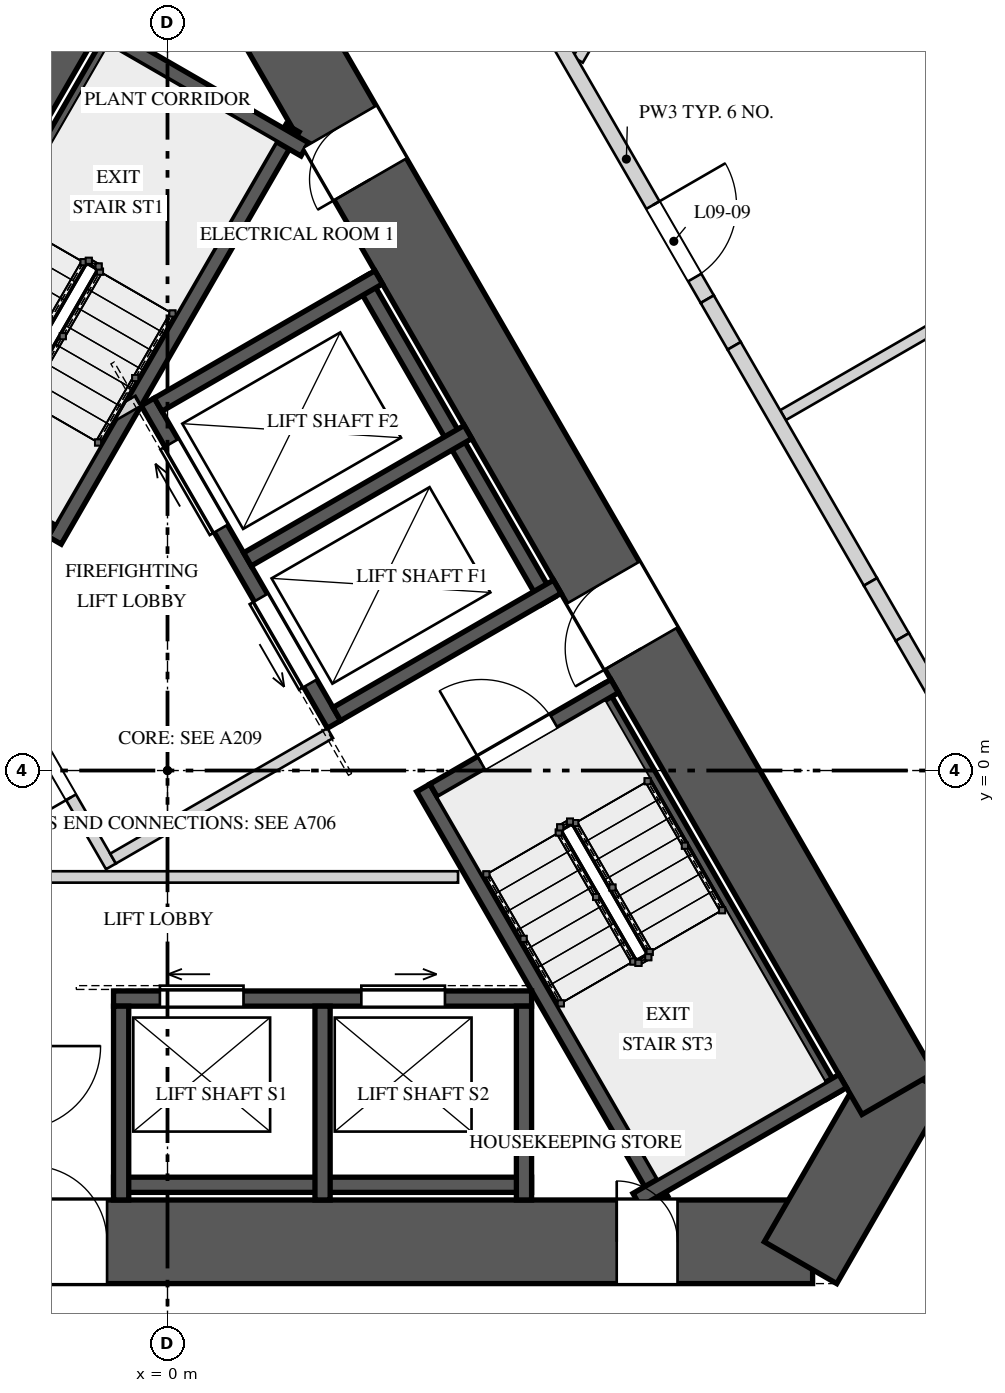
"""IFC4 building model, lengths in metres.
Left out: names, types, materials, properties, quantities, classifications, styles, units other than length and angle.
Written with IfcOpenShell. Run it as: python <this file> out.ifc"""

import sys

from ifc_helpers import new_model, si_unit, direction, frame, frame_2d, origin, place, context, subcontext, project, spatial, rectangle, extrude, element, fill, save


model = new_model("IFC4")
c1 = context("Model", 3, precision=1e-05, world=origin(), true_north=direction((0.0, 1.0)))
c2 = subcontext(c1, "Body", "Model", "MODEL_VIEW")
j1 = project(units=[si_unit("LENGTHUNIT", "METRE"), si_unit("PLANEANGLEUNIT", "RADIAN")], contexts=[c1])
p1 = place(None, origin())
s1 = spatial("IfcSite", under=j1, at=p1, CompositionType="ELEMENT")
p2 = place(p1, origin())
s2 = spatial("IfcBuilding", under=s1, at=p2, CompositionType="ELEMENT")
p3 = place(p2, frame((0.0, 0.0, 46.0)))
s3 = spatial("IfcBuildingStorey", under=s2, at=p3, CompositionType="ELEMENT", Elevation=46.0)
p4 = place(p3, frame((-1.126, 10.45, 0.0), z_axis=(0.0, 0.0, 1.0), x_axis=(-0.500001757713, -0.866024388966, 0.0)))
e1 = element("IfcWall", 1, at=p4, inside=s3, PredefinedType="SHEAR", context=c2, shape_type="SweptSolid", body=[
    extrude(rectangle(XDim=16.974, YDim=1.1, at=frame_2d((8.487, 0.0))), origin(), (0.0, 0.0, 1.0), 5.2),
])
p5 = place(p4, frame((6.692, 0.0, 0.0)))
e2 = element("IfcOpeningElement", 2, at=p5, cuts=e1, PredefinedType="OPENING", context=c2, shape_type="SweptSolid", body=[
    extrude(rectangle(XDim=1.0, YDim=2.4, at=frame_2d((0.5, 1.2))), frame((0.0, 0.56, 0.0), z_axis=(0.0, -1.0, 0.0), x_axis=(1.0, 0.0, 0.0)), (0.0, 0.0, 1.0), 1.12),
])
p6 = place(p3, frame((-8.487, -6.2, 0.0), z_axis=(0.0, 0.0, 1.0), x_axis=(1.0, 0.0, 0.0)))
e3 = element("IfcWall", 3, at=p6, inside=s3, PredefinedType="SHEAR", context=c2, shape_type="SweptSolid", body=[
    extrude(rectangle(XDim=16.974, YDim=1.1, at=frame_2d((8.487, 0.0))), origin(), (0.0, 0.0, 1.0), 5.2),
])
p7 = place(p6, frame((6.692, 0.0, 0.0)))
e4 = element("IfcOpeningElement", 4, at=p7, cuts=e3, PredefinedType="OPENING", context=c2, shape_type="SweptSolid", body=[
    extrude(rectangle(XDim=1.0, YDim=2.4, at=frame_2d((0.5, 1.2))), frame((0.0, 0.56, 0.0), z_axis=(0.0, -1.0, 0.0), x_axis=(1.0, 0.0, 0.0)), (0.0, 0.0, 1.0), 1.12),
])
p8 = place(p6, frame((14.397, 0.0, 0.0)))
e5 = element("IfcOpeningElement", 5, at=p8, cuts=e3, PredefinedType="OPENING", context=c2, shape_type="SweptSolid", body=[
    extrude(rectangle(XDim=0.8, YDim=2.1, at=frame_2d((0.4, 1.05))), frame((0.0, 0.56, 0.0), z_axis=(0.0, -1.0, 0.0), x_axis=(1.0, 0.0, 0.0)), (0.0, 0.0, 1.0), 1.12),
])
p9 = place(p3, frame((8.328, -6.475, 0.0), z_axis=(0.0, 0.0, 1.0), x_axis=(0.499995765644, 0.866027848477, 0.0)))
e6 = element("IfcWall", 6, at=p9, inside=s3, PredefinedType="SHEAR", context=c2, shape_type="SweptSolid", body=[
    extrude(rectangle(XDim=2.887, YDim=1.1, at=frame_2d((1.443, 0.0))), origin(), (0.0, 0.0, 1.0), 5.2),
])
p10 = place(p3, frame((9.613, -4.25, 0.0), z_axis=(0.0, 0.0, 1.0), x_axis=(-0.500001757713, 0.866024388966, 0.0)))
e7 = element("IfcWall", 7, at=p10, inside=s3, PredefinedType="SHEAR", context=c2, shape_type="SweptSolid", body=[
    extrude(rectangle(XDim=16.974, YDim=1.1, at=frame_2d((8.487, 0.0))), origin(), (0.0, 0.0, 1.0), 5.2),
])
p11 = place(p10, frame((6.762, 0.0, 0.0)))
e8 = element("IfcOpeningElement", 8, at=p11, cuts=e7, PredefinedType="OPENING", context=c2, shape_type="SweptSolid", body=[
    extrude(rectangle(XDim=1.0, YDim=2.4, at=frame_2d((0.5, 1.2))), frame((0.0, 0.56, 0.0), z_axis=(0.0, -1.0, 0.0), x_axis=(1.0, 0.0, 0.0)), (0.0, 0.0, 1.0), 1.12),
])
p12 = place(p10, frame((13.889, 0.0, 0.0)))
e9 = element("IfcOpeningElement", 9, at=p12, cuts=e7, PredefinedType="OPENING", context=c2, shape_type="SweptSolid", body=[
    extrude(rectangle(XDim=0.8, YDim=2.1, at=frame_2d((0.4, 1.05))), frame((0.0, 0.56, 0.0), z_axis=(0.0, -1.0, 0.0), x_axis=(1.0, 0.0, 0.0)), (0.0, 0.0, 1.0), 1.12),
])
p13 = place(p3, frame((-0.68, 9.722, 0.0), z_axis=(0.0, 0.0, 1.0), x_axis=(-0.49998037582, -0.866036733513, 0.0)))
e10 = element("IfcWall", 10, at=p13, inside=s3, PredefinedType="SOLIDWALL", context=c2, shape_type="SweptSolid", body=[
    extrude(rectangle(XDim=6.2, YDim=0.2, at=frame_2d((3.1, 0.0))), origin(), (0.0, 0.0, 1.0), 4.85),
])
p14 = place(p3, frame((1.646, 8.45, 0.0), z_axis=(0.0, 0.0, 1.0), x_axis=(-0.500006002103, -0.866021938441, 0.0)))
e11 = element("IfcWall", 11, at=p14, inside=s3, PredefinedType="SOLIDWALL", context=c2, shape_type="SweptSolid", body=[
    extrude(rectangle(XDim=6.261, YDim=0.2, at=frame_2d((3.13, 0.0))), origin(), (0.0, 0.0, 1.0), 4.85),
])
p15 = place(p3, frame((1.806, 8.172, 0.0), z_axis=(0.0, 0.0, 1.0), x_axis=(-0.866054327916, 0.499949898588, 0.0)))
e12 = element("IfcWall", 12, at=p15, inside=s3, PredefinedType="SOLIDWALL", context=c2, shape_type="SweptSolid", body=[
    extrude(rectangle(XDim=3.128, YDim=0.2, at=frame_2d((1.564, 0.0))), origin(), (0.0, 0.0, 1.0), 4.85),
])
p16 = place(p3, frame((-1.521, 3.165, 0.0), z_axis=(0.0, 0.0, 1.0), x_axis=(-0.866027397988, 0.499996545922, 0.0)))
e13 = element("IfcWall", 13, at=p16, inside=s3, PredefinedType="SOLIDWALL", context=c2, shape_type="SweptSolid", body=[
    extrude(rectangle(XDim=2.75, YDim=0.2, at=frame_2d((1.375, 0.0))), origin(), (0.0, 0.0, 1.0), 4.85),
])
p17 = place(p16, frame((0.725, 0.0, 0.0)))
e14 = element("IfcOpeningElement", 14, at=p17, cuts=e13, PredefinedType="OPENING", context=c2, shape_type="SweptSolid", body=[
    extrude(rectangle(XDim=1.1, YDim=2.4, at=frame_2d((0.55, 1.2))), frame((0.0, 0.11, 0.0), z_axis=(0.0, -1.0, 0.0), x_axis=(1.0, 0.0, 0.0)), (0.0, 0.0, 1.0), 0.22),
])
p18 = place(p3, frame((8.76, -4.272, 0.0), z_axis=(0.0, 0.0, 1.0), x_axis=(-0.49998037582, 0.866036733513, 0.0)))
e15 = element("IfcWall", 15, at=p18, inside=s3, PredefinedType="SOLIDWALL", context=c2, shape_type="SweptSolid", body=[
    extrude(rectangle(XDim=6.2, YDim=0.2, at=frame_2d((3.1, 0.0))), origin(), (0.0, 0.0, 1.0), 4.85),
])
p19 = place(p3, frame((6.495, -5.65, 0.0), z_axis=(0.0, 0.0, 1.0), x_axis=(-0.499976754523, 0.866038824151, 0.0)))
e16 = element("IfcWall", 16, at=p19, inside=s3, PredefinedType="SOLIDWALL", context=c2, shape_type="SweptSolid", body=[
    extrude(rectangle(XDim=6.26, YDim=0.2, at=frame_2d((3.13, 0.0))), origin(), (0.0, 0.0, 1.0), 4.85),
])
p20 = place(p3, frame((6.174, -5.65, 0.0), z_axis=(0.0, 0.0, 1.0), x_axis=(0.866054327916, 0.499949898588, 0.0)))
e17 = element("IfcWall", 17, at=p20, inside=s3, PredefinedType="SOLIDWALL", context=c2, shape_type="SweptSolid", body=[
    extrude(rectangle(XDim=3.128, YDim=0.2, at=frame_2d((1.564, 0.0))), origin(), (0.0, 0.0, 1.0), 4.85),
])
p21 = place(p3, frame((3.501, -0.265, 0.0), z_axis=(0.0, 0.0, 1.0), x_axis=(0.866027397988, 0.499996545922, 0.0)))
e18 = element("IfcWall", 18, at=p21, inside=s3, PredefinedType="SOLIDWALL", context=c2, shape_type="SweptSolid", body=[
    extrude(rectangle(XDim=2.75, YDim=0.2, at=frame_2d((1.375, 0.0))), origin(), (0.0, 0.0, 1.0), 4.85),
])
p22 = place(p21, frame((0.725, 0.0, 0.0)))
e19 = element("IfcOpeningElement", 19, at=p22, cuts=e18, PredefinedType="OPENING", context=c2, shape_type="SweptSolid", body=[
    extrude(rectangle(XDim=1.1, YDim=2.4, at=frame_2d((0.55, 1.2))), frame((0.0, 0.11, 0.0), z_axis=(0.0, -1.0, 0.0), x_axis=(1.0, 0.0, 0.0)), (0.0, 0.0, 1.0), 0.22),
])
p23 = place(p3, frame((-0.71, -3.0, 0.0), z_axis=(0.0, 0.0, 1.0), x_axis=(1.0, 0.0, 0.0)))
e20 = element("IfcWall", 20, at=p23, inside=s3, PredefinedType="SOLIDWALL", context=c2, shape_type="SweptSolid", body=[
    extrude(rectangle(XDim=5.5, YDim=0.2, at=frame_2d((2.75, 0.0))), origin(), (0.0, 0.0, 1.0), 4.85),
])
p24 = place(p23, frame((0.61, 0.0, 0.0)))
e21 = element("IfcOpeningElement", 21, at=p24, cuts=e20, PredefinedType="OPENING", context=c2, shape_type="SweptSolid", body=[
    extrude(rectangle(XDim=1.1, YDim=2.1, at=frame_2d((0.55, 1.05))), frame((0.0, 0.11, 0.0), z_axis=(0.0, -1.0, 0.0), x_axis=(1.0, 0.0, 0.0)), (0.0, 0.0, 1.0), 0.22),
])
p25 = place(p23, frame((3.26, 0.0, 0.0)))
e22 = element("IfcOpeningElement", 22, at=p25, cuts=e20, PredefinedType="OPENING", context=c2, shape_type="SweptSolid", body=[
    extrude(rectangle(XDim=1.1, YDim=2.1, at=frame_2d((0.55, 1.05))), frame((0.0, 0.11, 0.0), z_axis=(0.0, -1.0, 0.0), x_axis=(1.0, 0.0, 0.0)), (0.0, 0.0, 1.0), 0.22),
])
p26 = place(p3, frame((-0.71, -5.45, 0.0), z_axis=(0.0, 0.0, 1.0), x_axis=(1.0, 0.0, 0.0)))
e23 = element("IfcWall", 23, at=p26, inside=s3, PredefinedType="SOLIDWALL", context=c2, shape_type="SweptSolid", body=[
    extrude(rectangle(XDim=5.5, YDim=0.2, at=frame_2d((2.75, 0.0))), origin(), (0.0, 0.0, 1.0), 4.85),
])
for number, where, z_axis, x_axis in (
    (24, (-0.61, -3.1, 0.0), (0.0, 0.0, 1.0), (0.0, -1.0, 0.0)),
    (25, (2.04, -3.1, 0.0), (0.0, 0.0, 1.0), (0.0, -1.0, 0.0)),
    (26, (4.69, -3.1, 0.0), (0.0, 0.0, 1.0), (0.0, -1.0, 0.0)),
):
    element("IfcWall", number, at=place(p3, frame(where, z_axis=z_axis, x_axis=x_axis)), inside=s3, PredefinedType="SOLIDWALL", context=c2, shape_type="SweptSolid", body=[
        extrude(rectangle(XDim=2.55, YDim=0.2, at=frame_2d((1.275, 0.0))), origin(), (0.0, 0.0, 1.0), 4.85),
    ])
p27 = place(p3, frame((2.19, 0.606, 0.0), z_axis=(0.0, 0.0, 1.0), x_axis=(-0.500002801628, 0.866023786258, 0.0)))
e27 = element("IfcWall", 27, at=p27, inside=s3, PredefinedType="SOLIDWALL", context=c2, shape_type="SweptSolid", body=[
    extrude(rectangle(XDim=4.9, YDim=0.2, at=frame_2d((2.45, 0.0))), origin(), (0.0, 0.0, 1.0), 4.85),
])
p28 = place(p27, frame((0.625, 0.0, 0.0)))
e28 = element("IfcOpeningElement", 28, at=p28, cuts=e27, PredefinedType="OPENING", context=c2, shape_type="SweptSolid", body=[
    extrude(rectangle(XDim=1.3, YDim=2.1, at=frame_2d((0.65, 1.05))), frame((0.0, 0.11, 0.0), z_axis=(0.0, -1.0, 0.0), x_axis=(1.0, 0.0, 0.0)), (0.0, 0.0, 1.0), 0.22),
])
p29 = place(p27, frame((2.975, 0.0, 0.0)))
e29 = element("IfcOpeningElement", 29, at=p29, cuts=e27, PredefinedType="OPENING", context=c2, shape_type="SweptSolid", body=[
    extrude(rectangle(XDim=1.3, YDim=2.1, at=frame_2d((0.65, 1.05))), frame((0.0, 0.11, 0.0), z_axis=(0.0, -1.0, 0.0), x_axis=(1.0, 0.0, 0.0)), (0.0, 0.0, 1.0), 0.22),
])
p30 = place(p3, frame((5.005, 2.231, 0.0), z_axis=(0.0, 0.0, 1.0), x_axis=(-0.500002801628, 0.866023786258, 0.0)))
e30 = element("IfcWall", 30, at=p30, inside=s3, PredefinedType="SOLIDWALL", context=c2, shape_type="SweptSolid", body=[
    extrude(rectangle(XDim=4.9, YDim=0.2, at=frame_2d((2.45, 0.0))), origin(), (0.0, 0.0, 1.0), 4.85),
])
p31 = place(p3, frame((2.227, 0.743, 0.0), z_axis=(0.0, 0.0, 1.0), x_axis=(0.866014461049, 0.500018952895, 0.0)))
e31 = element("IfcWall", 31, at=p31, inside=s3, PredefinedType="SOLIDWALL", context=c2, shape_type="SweptSolid", body=[
    extrude(rectangle(XDim=3.35, YDim=0.2, at=frame_2d((1.675, 0.0))), origin(), (0.0, 0.0, 1.0), 4.85),
])
p32 = place(p3, frame((1.052, 2.778, 0.0), z_axis=(0.0, 0.0, 1.0), x_axis=(0.866032680314, 0.499987396469, 0.0)))
e32 = element("IfcWall", 32, at=p32, inside=s3, PredefinedType="SOLIDWALL", context=c2, shape_type="SweptSolid", body=[
    extrude(rectangle(XDim=3.35, YDim=0.2, at=frame_2d((1.675, 0.0))), origin(), (0.0, 0.0, 1.0), 4.85),
])
p33 = place(p3, frame((-0.123, 4.813, 0.0), z_axis=(0.0, 0.0, 1.0), x_axis=(0.866014461049, 0.500018952895, 0.0)))
e33 = element("IfcWall", 33, at=p33, inside=s3, PredefinedType="SOLIDWALL", context=c2, shape_type="SweptSolid", body=[
    extrude(rectangle(XDim=3.35, YDim=0.2, at=frame_2d((1.675, 0.0))), origin(), (0.0, 0.0, 1.0), 4.85),
])
p34 = place(p3, frame((-0.744, -1.261, 0.0), z_axis=(0.0, 0.0, 1.0), x_axis=(-0.500004234368, 0.866022959057, 0.0)))
e34 = element("IfcWall", 34, at=p34, inside=s3, PredefinedType="PARTITIONING", context=c2, shape_type="SweptSolid", body=[
    extrude(rectangle(XDim=3.125, YDim=0.15, at=frame_2d((1.562, 0.0))), origin(), (0.0, 0.0, 1.0), 4.85),
])
p35 = place(p34, frame((1.05, 0.0, 0.0)))
e35 = element("IfcOpeningElement", 35, at=p35, cuts=e34, PredefinedType="OPENING", context=c2, shape_type="SweptSolid", body=[
    extrude(rectangle(XDim=1.1, YDim=2.4, at=frame_2d((0.55, 1.2))), frame((0.0, 0.085, 0.0), z_axis=(0.0, -1.0, 0.0), x_axis=(1.0, 0.0, 0.0)), (0.0, 0.0, 1.0), 0.17),
])
p36 = place(p3, frame((-0.717, -1.159, 0.0), z_axis=(0.0, 0.0, 1.0), x_axis=(0.866008176907, 0.50002983664, 0.0)))
e36 = element("IfcWall", 36, at=p36, inside=s3, PredefinedType="PARTITIONING", context=c2, shape_type="SweptSolid", body=[
    extrude(rectangle(XDim=3.3, YDim=0.15, at=frame_2d((1.65, 0.0))), origin(), (0.0, 0.0, 1.0), 4.85),
])
p37 = place(p3, frame((-2.178, 1.372, 0.0), z_axis=(0.0, 0.0, 1.0), x_axis=(0.258808958833, 0.96592852884, 0.0)))
e37 = element("IfcWall", 37, at=p37, inside=s3, PredefinedType="PARTITIONING", context=c2, shape_type="SweptSolid", body=[
    extrude(rectangle(XDim=2.903, YDim=0.15, at=frame_2d((1.451, 0.0))), origin(), (0.0, 0.0, 1.0), 4.85),
])
p38 = place(p3, frame((-1.51, 4.215, 0.0), z_axis=(0.0, 0.0, 1.0), x_axis=(0.866085525409, 0.49989585183, 0.0)))
e38 = element("IfcWall", 38, at=p38, inside=s3, PredefinedType="PARTITIONING", context=c2, shape_type="SweptSolid", body=[
    extrude(rectangle(XDim=1.3, YDim=0.15, at=frame_2d((0.65, 0.0))), origin(), (0.0, 0.0, 1.0), 4.85),
])
p39 = place(p3, frame((-4.053, -1.4, 0.0), z_axis=(0.0, 0.0, 1.0), x_axis=(1.0, 0.0, 0.0)))
e39 = element("IfcWall", 39, at=p39, inside=s3, PredefinedType="PARTITIONING", context=c2, shape_type="SweptSolid", body=[
    extrude(rectangle(XDim=7.876, YDim=0.15, at=frame_2d((3.938, 0.0))), origin(), (0.0, 0.0, 1.0), 4.85),
])
p40 = place(p3, frame((8.097, 4.675, 0.0), z_axis=(0.0, 0.0, 1.0), x_axis=(0.866018381195, 0.500012163284, 0.0)))
e40 = element("IfcWall", 40, at=p40, inside=s3, PredefinedType="PARTITIONING", context=c2, shape_type="SweptSolid", body=[
    extrude(rectangle(XDim=8.0, YDim=0.15, at=frame_2d((4.0, 0.0))), origin(), (0.0, 0.0, 1.0), 4.85),
])
p41 = place(p3, frame((8.458, 14.65, 0.0), z_axis=(0.0, 0.0, 1.0), x_axis=(-0.500013695359, -0.866017496621, 0.0)))
e41 = element("IfcWall", 41, at=p41, inside=s3, PredefinedType="PARTITIONING", context=c2, shape_type="SweptSolid", body=[
    extrude(rectangle(XDim=6.119, YDim=0.15, at=frame_2d((3.06, 0.0))), origin(), (0.0, 0.0, 1.0), 4.85),
])
p42 = place(p3, frame((4.973, 9.887, 0.0), z_axis=(0.0, 0.0, 1.0), x_axis=(0.500000470374, -0.866025132214, 0.0)))
e42 = element("IfcWall", 42, at=p42, inside=s3, PredefinedType="SOLIDWALL", context=c2, shape_type="SweptSolid", body=[
    extrude(rectangle(XDim=4.257, YDim=0.2, at=frame_2d((2.128, 0.0))), origin(), (0.0, 0.0, 1.0), 4.85),
])
p43 = place(p42, frame((2.827, 0.0, 0.0)))
e43 = element("IfcOpeningElement", 43, at=p43, cuts=e42, PredefinedType="OPENING", context=c2, shape_type="SweptSolid", body=[
    extrude(rectangle(XDim=1.1, YDim=2.2, at=frame_2d((0.55, 1.1))), frame((0.0, 0.11, 0.0), z_axis=(0.0, -1.0, 0.0), x_axis=(1.0, 0.0, 0.0)), (0.0, 0.0, 1.0), 0.22),
])
p44 = place(p3, frame((7.101, 6.201, 0.0), z_axis=(0.0, 0.0, 1.0), x_axis=(0.499881507708, -0.866093804534, 0.0)))
e44 = element("IfcWall", 44, at=p44, inside=s3, PredefinedType="SOLIDWALL", context=c2, shape_type="SweptSolid", body=[
    extrude(rectangle(XDim=0.709, YDim=0.2, at=frame_2d((0.354, 0.0))), origin(), (0.0, 0.0, 1.0), 4.15),
])
p45 = place(p3, frame((7.455, 5.587, 0.0), z_axis=(0.0, 0.0, 1.0), x_axis=(0.500013241293, -0.866017758786, 0.0)))
e45 = element("IfcWall", 45, at=p45, inside=s3, PredefinedType="SOLIDWALL", context=c2, shape_type="SweptSolid", body=[
    extrude(rectangle(XDim=3.585, YDim=0.2, at=frame_2d((1.793, 0.0))), origin(), (0.0, 0.0, 1.0), 4.85),
])
p46 = place(p3, frame((9.248, 2.482, 0.0), z_axis=(0.0, 0.0, 1.0), x_axis=(0.500117447933, -0.865957584569, 0.0)))
e46 = element("IfcWall", 46, at=p46, inside=s3, PredefinedType="SOLIDWALL", context=c2, shape_type="SweptSolid", body=[
    extrude(rectangle(XDim=0.838, YDim=0.2, at=frame_2d((0.419, 0.0))), origin(), (0.0, 0.0, 1.0), 3.95),
])
p47 = place(p3, frame((9.667, 1.756, 0.0), z_axis=(0.0, 0.0, 1.0), x_axis=(0.499964529649, -0.866045881633, 0.0)))
e47 = element("IfcWall", 47, at=p47, inside=s3, PredefinedType="SOLIDWALL", context=c2, shape_type="SweptSolid", body=[
    extrude(rectangle(XDim=2.794, YDim=0.2, at=frame_2d((1.397, 0.0))), origin(), (0.0, 0.0, 1.0), 4.85),
])
p48 = place(p47, frame((1.18, 0.0, 0.0)))
e48 = element("IfcOpeningElement", 48, at=p48, cuts=e47, PredefinedType="OPENING", context=c2, shape_type="SweptSolid", body=[
    extrude(rectangle(XDim=1.1, YDim=2.2, at=frame_2d((0.55, 1.1))), frame((0.0, 0.11, 0.0), z_axis=(0.0, -1.0, 0.0), x_axis=(1.0, 0.0, 0.0)), (0.0, 0.0, 1.0), 0.22),
])
p49 = place(p22, origin())
e49 = element("IfcDoor", 49, at=p49, inside=s3, OperationType="SINGLE_SWING_RIGHT", PredefinedType="DOOR", context=c2, shape_type="SweptSolid", body=[
    extrude(rectangle(XDim=1.1, YDim=2.4, at=frame_2d((0.55, 1.2))), frame((0.0, 0.025, 0.0), z_axis=(0.0, -1.0, 0.0), x_axis=(1.0, 0.0, 0.0)), (0.0, 0.0, 1.0), 0.05),
])
fill(e19, e49)
p50 = place(p24, origin())
e50 = element("IfcDoor", 50, at=p50, inside=s3, OperationType="SLIDING_TO_LEFT", PredefinedType="DOOR", context=c2, shape_type="SweptSolid", body=[
    extrude(rectangle(XDim=1.1, YDim=2.1, at=frame_2d((0.55, 1.05))), frame((0.0, 0.025, 0.0), z_axis=(0.0, -1.0, 0.0), x_axis=(1.0, 0.0, 0.0)), (0.0, 0.0, 1.0), 0.05),
])
fill(e21, e50)
p51 = place(p25, origin())
e51 = element("IfcDoor", 51, at=p51, inside=s3, OperationType="SLIDING_TO_RIGHT", PredefinedType="DOOR", context=c2, shape_type="SweptSolid", body=[
    extrude(rectangle(XDim=1.1, YDim=2.1, at=frame_2d((0.55, 1.05))), frame((0.0, 0.025, 0.0), z_axis=(0.0, -1.0, 0.0), x_axis=(1.0, 0.0, 0.0)), (0.0, 0.0, 1.0), 0.05),
])
fill(e22, e51)
p52 = place(p28, origin())
e52 = element("IfcDoor", 52, at=p52, inside=s3, OperationType="SLIDING_TO_LEFT", PredefinedType="DOOR", context=c2, shape_type="SweptSolid", body=[
    extrude(rectangle(XDim=1.3, YDim=2.1, at=frame_2d((0.65, 1.05))), frame((0.0, 0.025, 0.0), z_axis=(0.0, -1.0, 0.0), x_axis=(1.0, 0.0, 0.0)), (0.0, 0.0, 1.0), 0.05),
])
fill(e28, e52)
p53 = place(p29, origin())
e53 = element("IfcDoor", 53, at=p53, inside=s3, OperationType="SLIDING_TO_RIGHT", PredefinedType="DOOR", context=c2, shape_type="SweptSolid", body=[
    extrude(rectangle(XDim=1.3, YDim=2.1, at=frame_2d((0.65, 1.05))), frame((0.0, 0.025, 0.0), z_axis=(0.0, -1.0, 0.0), x_axis=(1.0, 0.0, 0.0)), (0.0, 0.0, 1.0), 0.05),
])
fill(e29, e53)
p54 = place(p35, origin())
e54 = element("IfcDoor", 54, at=p54, inside=s3, OperationType="SINGLE_SWING_LEFT", PredefinedType="DOOR", context=c2, shape_type="SweptSolid", body=[
    extrude(rectangle(XDim=1.1, YDim=2.4, at=frame_2d((0.55, 1.2))), frame((0.0, 0.025, 0.0), z_axis=(0.0, -1.0, 0.0), x_axis=(1.0, 0.0, 0.0)), (0.0, 0.0, 1.0), 0.05),
])
fill(e35, e54)
p55 = place(p7, origin())
e55 = element("IfcDoor", 55, at=p55, inside=s3, OperationType="SINGLE_SWING_LEFT", PredefinedType="DOOR", context=c2, shape_type="SweptSolid", body=[
    extrude(rectangle(XDim=1.0, YDim=2.4, at=frame_2d((0.5, 1.2))), frame((0.0, 0.025, 0.0), z_axis=(0.0, -1.0, 0.0), x_axis=(1.0, 0.0, 0.0)), (0.0, 0.0, 1.0), 0.05),
])
fill(e4, e55)
p56 = place(p11, origin())
e56 = element("IfcDoor", 56, at=p56, inside=s3, OperationType="SINGLE_SWING_RIGHT", PredefinedType="DOOR", context=c2, shape_type="SweptSolid", body=[
    extrude(rectangle(XDim=1.0, YDim=2.4, at=frame_2d((0.5, 1.2))), frame((0.0, 0.025, 0.0), z_axis=(0.0, -1.0, 0.0), x_axis=(1.0, 0.0, 0.0)), (0.0, 0.0, 1.0), 0.05),
])
fill(e8, e56)
p57 = place(p8, origin())
e57 = element("IfcDoor", 57, at=p57, inside=s3, OperationType="SINGLE_SWING_LEFT", PredefinedType="DOOR", context=c2, shape_type="SweptSolid", body=[
    extrude(rectangle(XDim=0.8, YDim=2.1, at=frame_2d((0.4, 1.05))), frame((0.0, 0.025, 0.0), z_axis=(0.0, -1.0, 0.0), x_axis=(1.0, 0.0, 0.0)), (0.0, 0.0, 1.0), 0.05),
])
fill(e5, e57)
p58 = place(p12, origin())
e58 = element("IfcDoor", 58, at=p58, inside=s3, OperationType="SINGLE_SWING_RIGHT", PredefinedType="DOOR", context=c2, shape_type="SweptSolid", body=[
    extrude(rectangle(XDim=0.8, YDim=2.1, at=frame_2d((0.4, 1.05))), frame((0.0, 0.025, 0.0), z_axis=(0.0, -1.0, 0.0), x_axis=(1.0, 0.0, 0.0)), (0.0, 0.0, 1.0), 0.05),
])
fill(e9, e58)
p59 = place(p43, origin())
e59 = element("IfcDoor", 59, at=p59, inside=s3, OperationType="SINGLE_SWING_LEFT", PredefinedType="DOOR", context=c2, shape_type="SweptSolid", body=[
    extrude(rectangle(XDim=1.1, YDim=2.2, at=frame_2d((0.55, 1.1))), frame((0.0, 0.025, 0.0), z_axis=(0.0, -1.0, 0.0), x_axis=(1.0, 0.0, 0.0)), (0.0, 0.0, 1.0), 0.05),
])
fill(e43, e59)
save(model, sys.argv[1])
